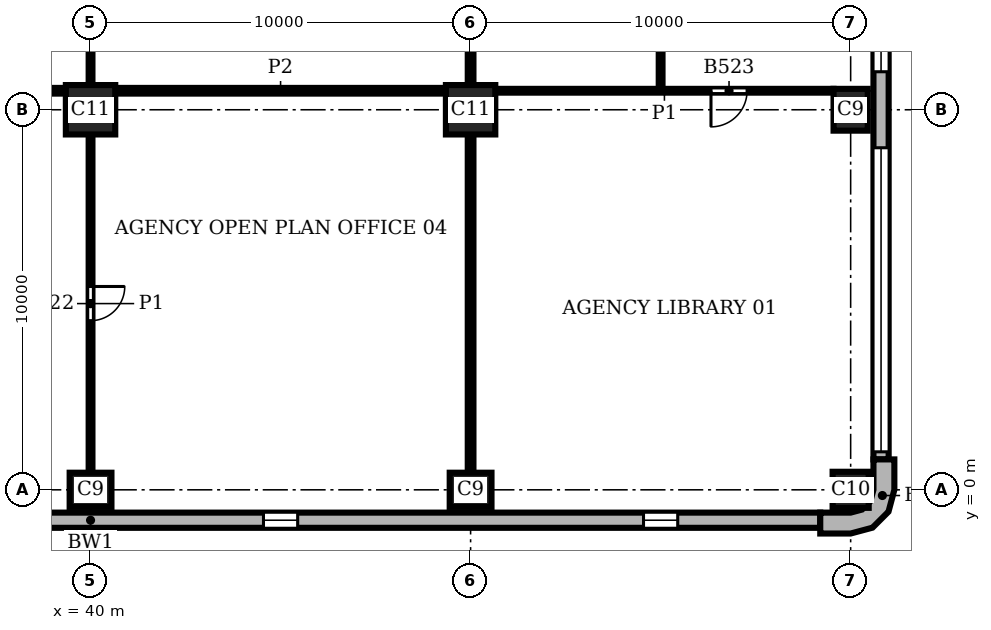
"""IFC4 building model, lengths in metres.
Left out: names, types, materials, properties, quantities, classifications, styles, units other than length and angle.
Written with IfcOpenShell. Run it as: python <this file> out.ifc"""

import sys

from ifc_helpers import new_model, si_unit, direction, frame, frame_2d, origin, origin_2d, place, context, subcontext, project, spatial, polyline, rectangle, outline, extrude, element, fill, save


model = new_model("IFC4")
c1 = context("Model", 3, precision=1e-05, world=origin(), true_north=direction((0.0, 1.0)))
c2 = subcontext(c1, "Body", "Model", "MODEL_VIEW")
j1 = project(units=[si_unit("LENGTHUNIT", "METRE"), si_unit("PLANEANGLEUNIT", "RADIAN")], contexts=[c1])
p1 = place(None, origin())
s1 = spatial("IfcSite", under=j1, at=p1, CompositionType="ELEMENT")
p2 = place(p1, origin())
s2 = spatial("IfcBuilding", under=s1, at=p2, CompositionType="ELEMENT")
p3 = place(p2, frame((0.0, 0.0, 178.5)))
s3 = spatial("IfcBuildingStorey", under=s2, at=p3, CompositionType="ELEMENT", Elevation=178.5)
for number, where, z_axis, x_axis in (
    (1, (40.0, 0.0, 0.0), (0.0, 0.0, 1.0), (1.0, 0.0, 0.0)),
    (2, (50.0, 0.0, 0.0), (0.0, 0.0, 1.0), (1.0, 0.0, 0.0)),
):
    element("IfcColumn", number, at=place(p3, frame(where, z_axis=z_axis, x_axis=x_axis)), inside=s3, PredefinedType="COLUMN", context=c2, shape_type="SweptSolid", body=[
        extrude(rectangle(XDim=1.1, YDim=0.9, at=origin_2d()), origin(), (0.0, 0.0, 1.0), 3.9),
    ])
p4 = place(p3, frame((60.0, 0.0, 0.0), z_axis=(0.0, 0.0, 1.0), x_axis=(1.0, 0.0, 0.0)))
e3 = element("IfcColumn", 3, at=p4, inside=s3, PredefinedType="COLUMN", context=c2, shape_type="SweptSolid", body=[
    extrude(rectangle(XDim=0.95, YDim=0.95, at=origin_2d()), origin(), (0.0, 0.0, 1.0), 3.9),
])
p5 = place(p3, frame((60.0, 10.0, 0.0), z_axis=(0.0, 0.0, 1.0), x_axis=(0.0, 1.0, 0.0)))
e4 = element("IfcColumn", 4, at=p5, inside=s3, PredefinedType="COLUMN", context=c2, shape_type="SweptSolid", body=[
    extrude(rectangle(XDim=1.1, YDim=0.9, at=origin_2d()), origin(), (0.0, 0.0, 1.0), 3.9),
])
for number, where, z_axis, x_axis in (
    (5, (40.0, 10.0, 0.0), (0.0, 0.0, 1.0), (1.0, 0.0, 0.0)),
    (6, (50.0, 10.0, 0.0), (0.0, 0.0, 1.0), (1.0, 0.0, 0.0)),
):
    element("IfcColumn", number, at=place(p3, frame(where, z_axis=z_axis, x_axis=x_axis)), inside=s3, PredefinedType="COLUMN", context=c2, shape_type="SweptSolid", body=[
        extrude(rectangle(XDim=1.3, YDim=1.3, at=origin_2d()), origin(), (0.0, 0.0, 1.0), 3.9),
    ])
p6 = place(p3, origin())
e7 = element("IfcWall", 7, at=p6, inside=s3, PredefinedType="SOLIDWALL", context=c2, shape_type="SweptSolid", body=[
    extrude(outline(polyline([(59.2, -1.0), (59.2, -1.15), (60.0, -1.15), (60.575, -0.996), (60.996, -0.575), (61.15, 0.0), (61.15, 0.8), (61.0, 0.8), (60.6, 0.8), (60.6, 0.0), (60.52, -0.3), (60.3, -0.52), (60.0, -0.6), (59.2, -0.6), (59.2, -1.0)])), origin(), (0.0, 0.0, 1.0), 3.9),
])
p7 = place(p3, frame((20.8, -0.8, 0.0), z_axis=(0.0, 0.0, 1.0), x_axis=(1.0, 0.0, 0.0)))
e8 = element("IfcWall", 8, at=p7, inside=s3, PredefinedType="SOLIDWALL", context=c2, shape_type="SweptSolid", body=[
    extrude(rectangle(XDim=38.4, YDim=0.4, at=frame_2d((19.2, 0.0))), origin(), (0.0, 0.0, 1.0), 3.9),
])
p8 = place(p7, frame((3.75, 0.0, 0.9)))
e9 = element("IfcOpeningElement", 9, at=p8, cuts=e8, PredefinedType="OPENING", context=c2, shape_type="SweptSolid", body=[
    extrude(rectangle(XDim=0.9, YDim=2.35, at=frame_2d((0.45, 1.175))), frame((0.0, 0.21, 0.0), z_axis=(0.0, -1.0, 0.0), x_axis=(1.0, 0.0, 0.0)), (0.0, 0.0, 1.0), 0.42),
])
p9 = place(p7, frame((13.75, 0.0, 0.9)))
e10 = element("IfcOpeningElement", 10, at=p9, cuts=e8, PredefinedType="OPENING", context=c2, shape_type="SweptSolid", body=[
    extrude(rectangle(XDim=0.9, YDim=2.35, at=frame_2d((0.45, 1.175))), frame((0.0, 0.21, 0.0), z_axis=(0.0, -1.0, 0.0), x_axis=(1.0, 0.0, 0.0)), (0.0, 0.0, 1.0), 0.42),
])
p10 = place(p7, frame((23.75, 0.0, 0.9)))
e11 = element("IfcOpeningElement", 11, at=p10, cuts=e8, PredefinedType="OPENING", context=c2, shape_type="SweptSolid", body=[
    extrude(rectangle(XDim=0.9, YDim=2.35, at=frame_2d((0.45, 1.175))), frame((0.0, 0.21, 0.0), z_axis=(0.0, -1.0, 0.0), x_axis=(1.0, 0.0, 0.0)), (0.0, 0.0, 1.0), 0.42),
])
p11 = place(p7, frame((33.75, 0.0, 0.9)))
e12 = element("IfcOpeningElement", 12, at=p11, cuts=e8, PredefinedType="OPENING", context=c2, shape_type="SweptSolid", body=[
    extrude(rectangle(XDim=0.9, YDim=2.35, at=frame_2d((0.45, 1.175))), frame((0.0, 0.21, 0.0), z_axis=(0.0, -1.0, 0.0), x_axis=(1.0, 0.0, 0.0)), (0.0, 0.0, 1.0), 0.42),
])
p12 = place(p3, frame((60.8, 0.8, 0.0), z_axis=(0.0, 0.0, 1.0), x_axis=(0.0, 1.0, 0.0)))
e13 = element("IfcWall", 13, at=p12, inside=s3, PredefinedType="SOLIDWALL", context=c2, shape_type="SweptSolid", body=[
    extrude(rectangle(XDim=28.4, YDim=0.4, at=frame_2d((14.2, 0.0))), origin(), (0.0, 0.0, 1.0), 3.9),
])
p13 = place(p12, frame((0.2, 0.0, 0.9)))
e14 = element("IfcOpeningElement", 14, at=p13, cuts=e13, PredefinedType="OPENING", context=c2, shape_type="SweptSolid", body=[
    extrude(rectangle(XDim=8.0, YDim=2.35, at=frame_2d((4.0, 1.175))), frame((0.0, 0.21, 0.0), z_axis=(0.0, -1.0, 0.0), x_axis=(1.0, 0.0, 0.0)), (0.0, 0.0, 1.0), 0.42),
])
p14 = place(p12, frame((10.2, 0.0, 0.9)))
e15 = element("IfcOpeningElement", 15, at=p14, cuts=e13, PredefinedType="OPENING", context=c2, shape_type="SweptSolid", body=[
    extrude(rectangle(XDim=8.0, YDim=2.35, at=frame_2d((4.0, 1.175))), frame((0.0, 0.21, 0.0), z_axis=(0.0, -1.0, 0.0), x_axis=(1.0, 0.0, 0.0)), (0.0, 0.0, 1.0), 0.42),
])
p15 = place(p12, frame((20.2, 0.0, 0.9)))
e16 = element("IfcOpeningElement", 16, at=p15, cuts=e13, PredefinedType="OPENING", context=c2, shape_type="SweptSolid", body=[
    extrude(rectangle(XDim=8.0, YDim=2.35, at=frame_2d((4.0, 1.175))), frame((0.0, 0.21, 0.0), z_axis=(0.0, -1.0, 0.0), x_axis=(1.0, 0.0, 0.0)), (0.0, 0.0, 1.0), 0.42),
])
p16 = place(p3, frame((40.0, 0.45, 0.0), z_axis=(0.0, 0.0, 1.0), x_axis=(0.0, 1.0, 0.0)))
e17 = element("IfcWall", 17, at=p16, inside=s3, PredefinedType="PARTITIONING", context=c2, shape_type="SweptSolid", body=[
    extrude(rectangle(XDim=8.9, YDim=0.1, at=frame_2d((4.45, 0.0))), origin(), (0.0, 0.0, 1.0), 3.58),
])
p17 = place(p16, frame((4.0, 0.0, 0.0)))
e18 = element("IfcOpeningElement", 18, at=p17, cuts=e17, PredefinedType="OPENING", context=c2, shape_type="SweptSolid", body=[
    extrude(rectangle(XDim=0.9, YDim=2.1, at=frame_2d((0.45, 1.05))), frame((0.0, 0.06, 0.0), z_axis=(0.0, -1.0, 0.0), x_axis=(1.0, 0.0, 0.0)), (0.0, 0.0, 1.0), 0.12),
])
p18 = place(p3, frame((40.0, 10.65, 0.0), z_axis=(0.0, 0.0, 1.0), x_axis=(0.0, 1.0, 0.0)))
e19 = element("IfcWall", 19, at=p18, inside=s3, PredefinedType="PARTITIONING", context=c2, shape_type="SweptSolid", body=[
    extrude(rectangle(XDim=8.7, YDim=0.1, at=frame_2d((4.35, 0.0))), origin(), (0.0, 0.0, 1.0), 3.58),
])
p19 = place(p18, frame((3.15, 0.0, 0.0)))
e20 = element("IfcOpeningElement", 20, at=p19, cuts=e19, PredefinedType="OPENING", context=c2, shape_type="SweptSolid", body=[
    extrude(rectangle(XDim=0.9, YDim=2.1, at=frame_2d((0.45, 1.05))), frame((0.0, 0.06, 0.0), z_axis=(0.0, -1.0, 0.0), x_axis=(1.0, 0.0, 0.0)), (0.0, 0.0, 1.0), 0.12),
])
p20 = place(p3, frame((55.0, 10.5, 0.0), z_axis=(0.0, 0.0, 1.0), x_axis=(0.0, 1.0, 0.0)))
e21 = element("IfcWall", 21, at=p20, inside=s3, PredefinedType="PARTITIONING", context=c2, shape_type="SweptSolid", body=[
    extrude(rectangle(XDim=15.5, YDim=0.1, at=frame_2d((7.75, 0.0))), origin(), (0.0, 0.0, 1.0), 3.58),
])
p21 = place(p20, frame((4.125, 0.0, 0.0)))
e22 = element("IfcOpeningElement", 22, at=p21, cuts=e21, PredefinedType="OPENING", context=c2, shape_type="SweptSolid", body=[
    extrude(rectangle(XDim=0.95, YDim=2.1, at=frame_2d((0.475, 1.05))), frame((0.0, 0.06, 0.0), z_axis=(0.0, -1.0, 0.0), x_axis=(1.0, 0.0, 0.0)), (0.0, 0.0, 1.0), 0.12),
])
p22 = place(p3, frame((50.65, 10.5, 0.0), z_axis=(0.0, 0.0, 1.0), x_axis=(1.0, 0.0, 0.0)))
e23 = element("IfcWall", 23, at=p22, inside=s3, PredefinedType="PARTITIONING", context=c2, shape_type="SweptSolid", body=[
    extrude(rectangle(XDim=8.9, YDim=0.1, at=frame_2d((4.45, 0.0))), origin(), (0.0, 0.0, 1.0), 3.58),
])
p23 = place(p22, frame((5.675, 0.0, 0.0)))
e24 = element("IfcOpeningElement", 24, at=p23, cuts=e23, PredefinedType="OPENING", context=c2, shape_type="SweptSolid", body=[
    extrude(rectangle(XDim=0.95, YDim=2.1, at=frame_2d((0.475, 1.05))), frame((0.0, 0.06, 0.0), z_axis=(0.0, -1.0, 0.0), x_axis=(1.0, 0.0, 0.0)), (0.0, 0.0, 1.0), 0.12),
])
p24 = place(p3, frame((50.0, 0.45, 0.0), z_axis=(0.0, 0.0, 1.0), x_axis=(0.0, 1.0, 0.0)))
e25 = element("IfcWall", 25, at=p24, inside=s3, PredefinedType="PARTITIONING", context=c2, shape_type="SweptSolid", body=[
    extrude(rectangle(XDim=8.9, YDim=0.15, at=frame_2d((4.45, 0.0))), origin(), (0.0, 0.0, 1.0), 3.58),
])
p25 = place(p3, frame((50.0, 10.65, 0.0), z_axis=(0.0, 0.0, 1.0), x_axis=(0.0, 1.0, 0.0)))
e26 = element("IfcWall", 26, at=p25, inside=s3, PredefinedType="PARTITIONING", context=c2, shape_type="SweptSolid", body=[
    extrude(rectangle(XDim=8.7, YDim=0.15, at=frame_2d((4.35, 0.0))), origin(), (0.0, 0.0, 1.0), 3.58),
])
p26 = place(p3, frame((33.201, 10.5, 0.0), z_axis=(0.0, 0.0, 1.0), x_axis=(1.0, 0.0, 0.0)))
e27 = element("IfcWall", 27, at=p26, inside=s3, PredefinedType="PARTITIONING", context=c2, shape_type="SweptSolid", body=[
    extrude(rectangle(XDim=6.149, YDim=0.15, at=frame_2d((3.075, 0.0))), origin(), (0.0, 0.0, 1.0), 3.58),
])
p27 = place(p3, frame((40.65, 10.5, 0.0), z_axis=(0.0, 0.0, 1.0), x_axis=(1.0, 0.0, 0.0)))
e28 = element("IfcWall", 28, at=p27, inside=s3, PredefinedType="PARTITIONING", context=c2, shape_type="SweptSolid", body=[
    extrude(rectangle(XDim=8.7, YDim=0.15, at=frame_2d((4.35, 0.0))), origin(), (0.0, 0.0, 1.0), 3.58),
])
p28 = place(p10, origin())
e29 = element("IfcWindow", 29, at=p28, inside=s3, PartitioningType="SINGLE_PANEL", PredefinedType="WINDOW", context=c2, shape_type="SweptSolid", body=[
    extrude(rectangle(XDim=0.9, YDim=2.35, at=frame_2d((0.45, 1.175))), frame((0.0, 0.16, 0.0), z_axis=(0.0, -1.0, 0.0), x_axis=(1.0, 0.0, 0.0)), (0.0, 0.0, 1.0), 0.06),
])
fill(e11, e29)
p29 = place(p11, origin())
e30 = element("IfcWindow", 30, at=p29, inside=s3, PartitioningType="SINGLE_PANEL", PredefinedType="WINDOW", context=c2, shape_type="SweptSolid", body=[
    extrude(rectangle(XDim=0.9, YDim=2.35, at=frame_2d((0.45, 1.175))), frame((0.0, 0.16, 0.0), z_axis=(0.0, -1.0, 0.0), x_axis=(1.0, 0.0, 0.0)), (0.0, 0.0, 1.0), 0.06),
])
fill(e12, e30)
p30 = place(p13, origin())
e31 = element("IfcWindow", 31, at=p30, inside=s3, PartitioningType="SINGLE_PANEL", PredefinedType="WINDOW", context=c2, shape_type="SweptSolid", body=[
    extrude(rectangle(XDim=8.0, YDim=2.35, at=frame_2d((4.0, 1.175))), frame((0.0, 0.16, 0.0), z_axis=(0.0, -1.0, 0.0), x_axis=(1.0, 0.0, 0.0)), (0.0, 0.0, 1.0), 0.06),
])
fill(e14, e31)
p31 = place(p14, origin())
e32 = element("IfcWindow", 32, at=p31, inside=s3, PartitioningType="SINGLE_PANEL", PredefinedType="WINDOW", context=c2, shape_type="SweptSolid", body=[
    extrude(rectangle(XDim=8.0, YDim=2.35, at=frame_2d((4.0, 1.175))), frame((0.0, 0.16, 0.0), z_axis=(0.0, -1.0, 0.0), x_axis=(1.0, 0.0, 0.0)), (0.0, 0.0, 1.0), 0.06),
])
fill(e15, e32)
p32 = place(p17, frame((0.9, 0.0, 0.0), z_axis=(0.0, 0.0, 1.0), x_axis=(-1.0, 0.0, 0.0)))
e33 = element("IfcDoor", 33, at=p32, inside=s3, OperationType="SINGLE_SWING_LEFT", PredefinedType="DOOR", context=c2, shape_type="SweptSolid", body=[
    extrude(rectangle(XDim=0.9, YDim=2.1, at=frame_2d((0.45, 1.05))), frame((0.0, 0.025, 0.0), z_axis=(0.0, -1.0, 0.0), x_axis=(1.0, 0.0, 0.0)), (0.0, 0.0, 1.0), 0.05),
])
fill(e18, e33)
p33 = place(p23, frame((0.95, 0.0, 0.0), z_axis=(0.0, 0.0, 1.0), x_axis=(-1.0, 0.0, 0.0)))
e34 = element("IfcDoor", 34, at=p33, inside=s3, OperationType="SINGLE_SWING_RIGHT", PredefinedType="DOOR", context=c2, shape_type="SweptSolid", body=[
    extrude(rectangle(XDim=0.95, YDim=2.1, at=frame_2d((0.475, 1.05))), frame((0.0, 0.025, 0.0), z_axis=(0.0, -1.0, 0.0), x_axis=(1.0, 0.0, 0.0)), (0.0, 0.0, 1.0), 0.05),
])
fill(e24, e34)
save(model, sys.argv[1])
